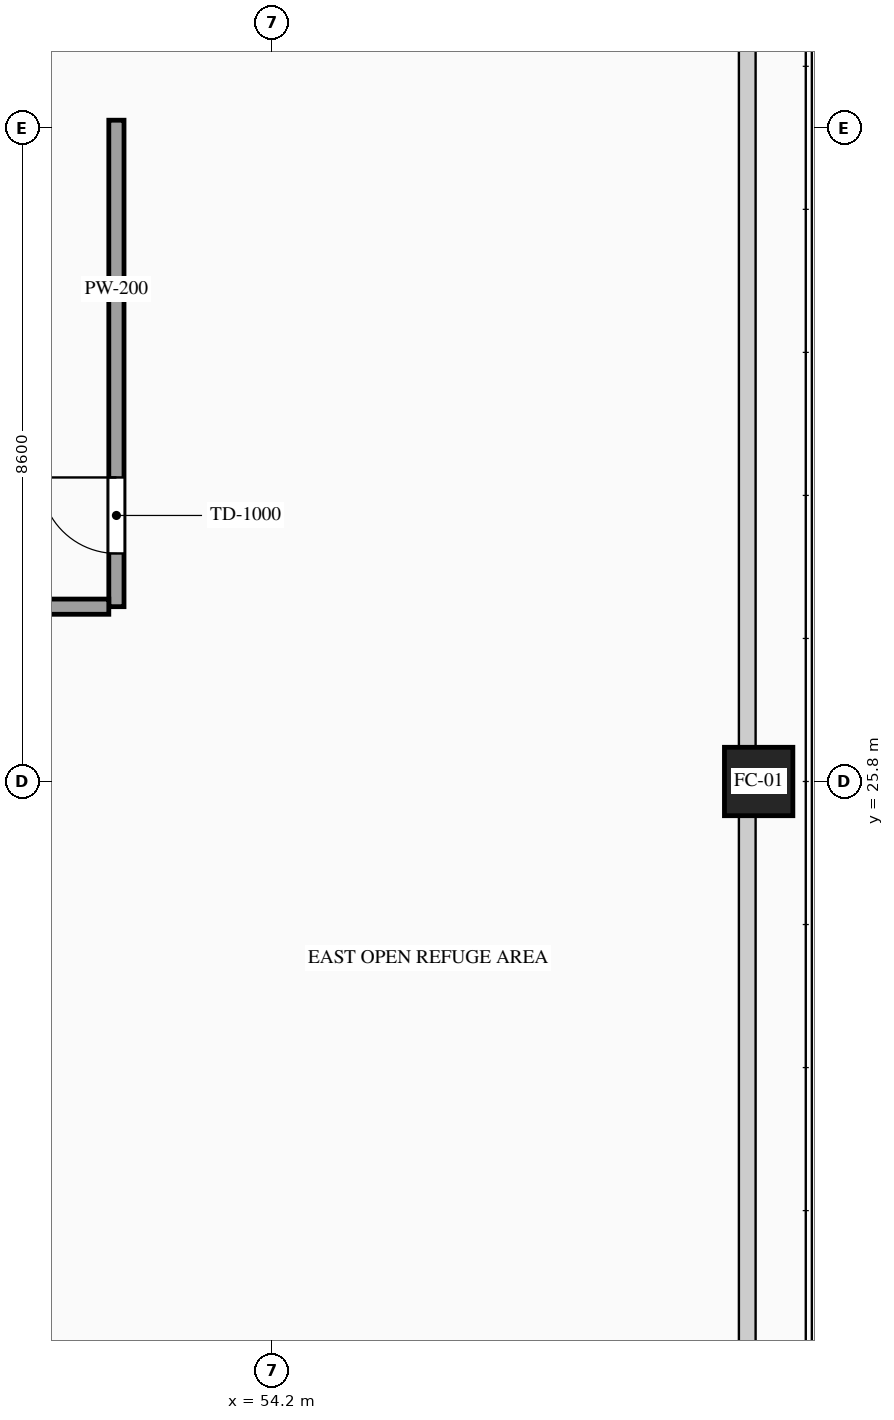
"""IFC4 building model, lengths in metres.
Left out: names, types, materials, properties, quantities, classifications, styles, units other than length and angle.
Written with IfcOpenShell. Run it as: python <this file> out.ifc"""

import sys

from ifc_helpers import new_model, si_unit, direction, frame, frame_2d, origin, origin_2d, place, context, subcontext, project, spatial, rectangle, hollow_rectangle, extrude, source, transform, mapped, element, fill, save


model = new_model("IFC4")
c1 = context("Model", 3, precision=1e-05, world=origin(), true_north=direction((0.0, 1.0)))
c2 = subcontext(c1, "Body", "Model", "MODEL_VIEW")
j1 = project(units=[si_unit("LENGTHUNIT", "METRE"), si_unit("PLANEANGLEUNIT", "RADIAN")], contexts=[c1])
p1 = place(None, origin())
s1 = spatial("IfcSite", under=j1, at=p1, CompositionType="ELEMENT")
p2 = place(p1, origin())
s2 = spatial("IfcBuilding", under=s1, at=p2, CompositionType="ELEMENT")
p3 = place(p2, frame((0.0, 0.0, 129.8)))
s3 = spatial("IfcBuildingStorey", under=s2, at=p3, CompositionType="ELEMENT", Elevation=129.8)
m1 = source(origin(), c2, "Body", "SweptSolid", [
    extrude(hollow_rectangle(XDim=0.9, YDim=0.9, WallThickness=0.042, at=origin_2d()), origin(), (0.0, 0.0, 1.0), 4.6),
])
p4 = place(p3, frame((60.6, 25.8, 0.0), z_axis=(0.0, 0.0, 1.0), x_axis=(1.0, 0.0, 0.0)))
e1 = element("IfcColumn", 1, at=p4, inside=s3, PredefinedType="COLUMN", context=c2, shape_type="MappedRepresentation", body=[
    mapped(m1, transform((0.0, 0.0, 0.0), scale=1.0)),
])
p5 = place(p3, frame((52.15, 28.1, 0.0), z_axis=(0.0, 0.0, 1.0), x_axis=(0.0, 1.0, 0.0)))
e2 = element("IfcWall", 2, at=p5, inside=s3, PredefinedType="PARTITIONING", context=c2, shape_type="SweptSolid", body=[
    extrude(rectangle(XDim=6.4, YDim=0.2, at=frame_2d((3.2, 0.0))), origin(), (0.0, 0.0, 1.0), 4.38),
])
p6 = place(p5, frame((0.7, 0.0, 0.0)))
e3 = element("IfcOpeningElement", 3, at=p6, cuts=e2, PredefinedType="OPENING", context=c2, shape_type="SweptSolid", body=[
    extrude(rectangle(XDim=1.0, YDim=2.2, at=frame_2d((0.5, 1.1))), frame((0.0, 0.115, 0.0), z_axis=(0.0, -1.0, 0.0), x_axis=(1.0, 0.0, 0.0)), (0.0, 0.0, 1.0), 0.23),
])
m2 = source(origin(), c2, "Body", "SweptSolid", [
    extrude(rectangle(XDim=1.455, YDim=0.2, at=frame_2d((0.728, 0.0))), origin(), (0.0, 0.0, 1.0), 4.38),
])
p7 = place(p3, frame((50.595, 28.1, 0.0), z_axis=(0.0, 0.0, 1.0), x_axis=(1.0, 0.0, 0.0)))
e4 = element("IfcWall", 4, at=p7, inside=s3, PredefinedType="PARTITIONING", context=c2, shape_type="MappedRepresentation", body=[
    mapped(m2, transform((0.0, 0.0, 0.0), scale=1.0)),
])
m3 = source(origin(), c2, "Body", "SweptSolid", [
    extrude(rectangle(XDim=1.0, YDim=2.2, at=frame_2d((0.5, 1.1))), frame((0.0, 0.025, 0.0), z_axis=(0.0, -1.0, 0.0), x_axis=(1.0, 0.0, 0.0)), (0.0, 0.0, 1.0), 0.05),
])
p8 = place(p6, origin())
e5 = element("IfcDoor", 5, at=p8, inside=s3, OperationType="SINGLE_SWING_RIGHT", PredefinedType="DOOR", context=c2, shape_type="MappedRepresentation", body=[
    mapped(m3, transform((0.0, 0.0, 0.0), scale=1.0)),
])
fill(e3, e5)
save(model, sys.argv[1])
